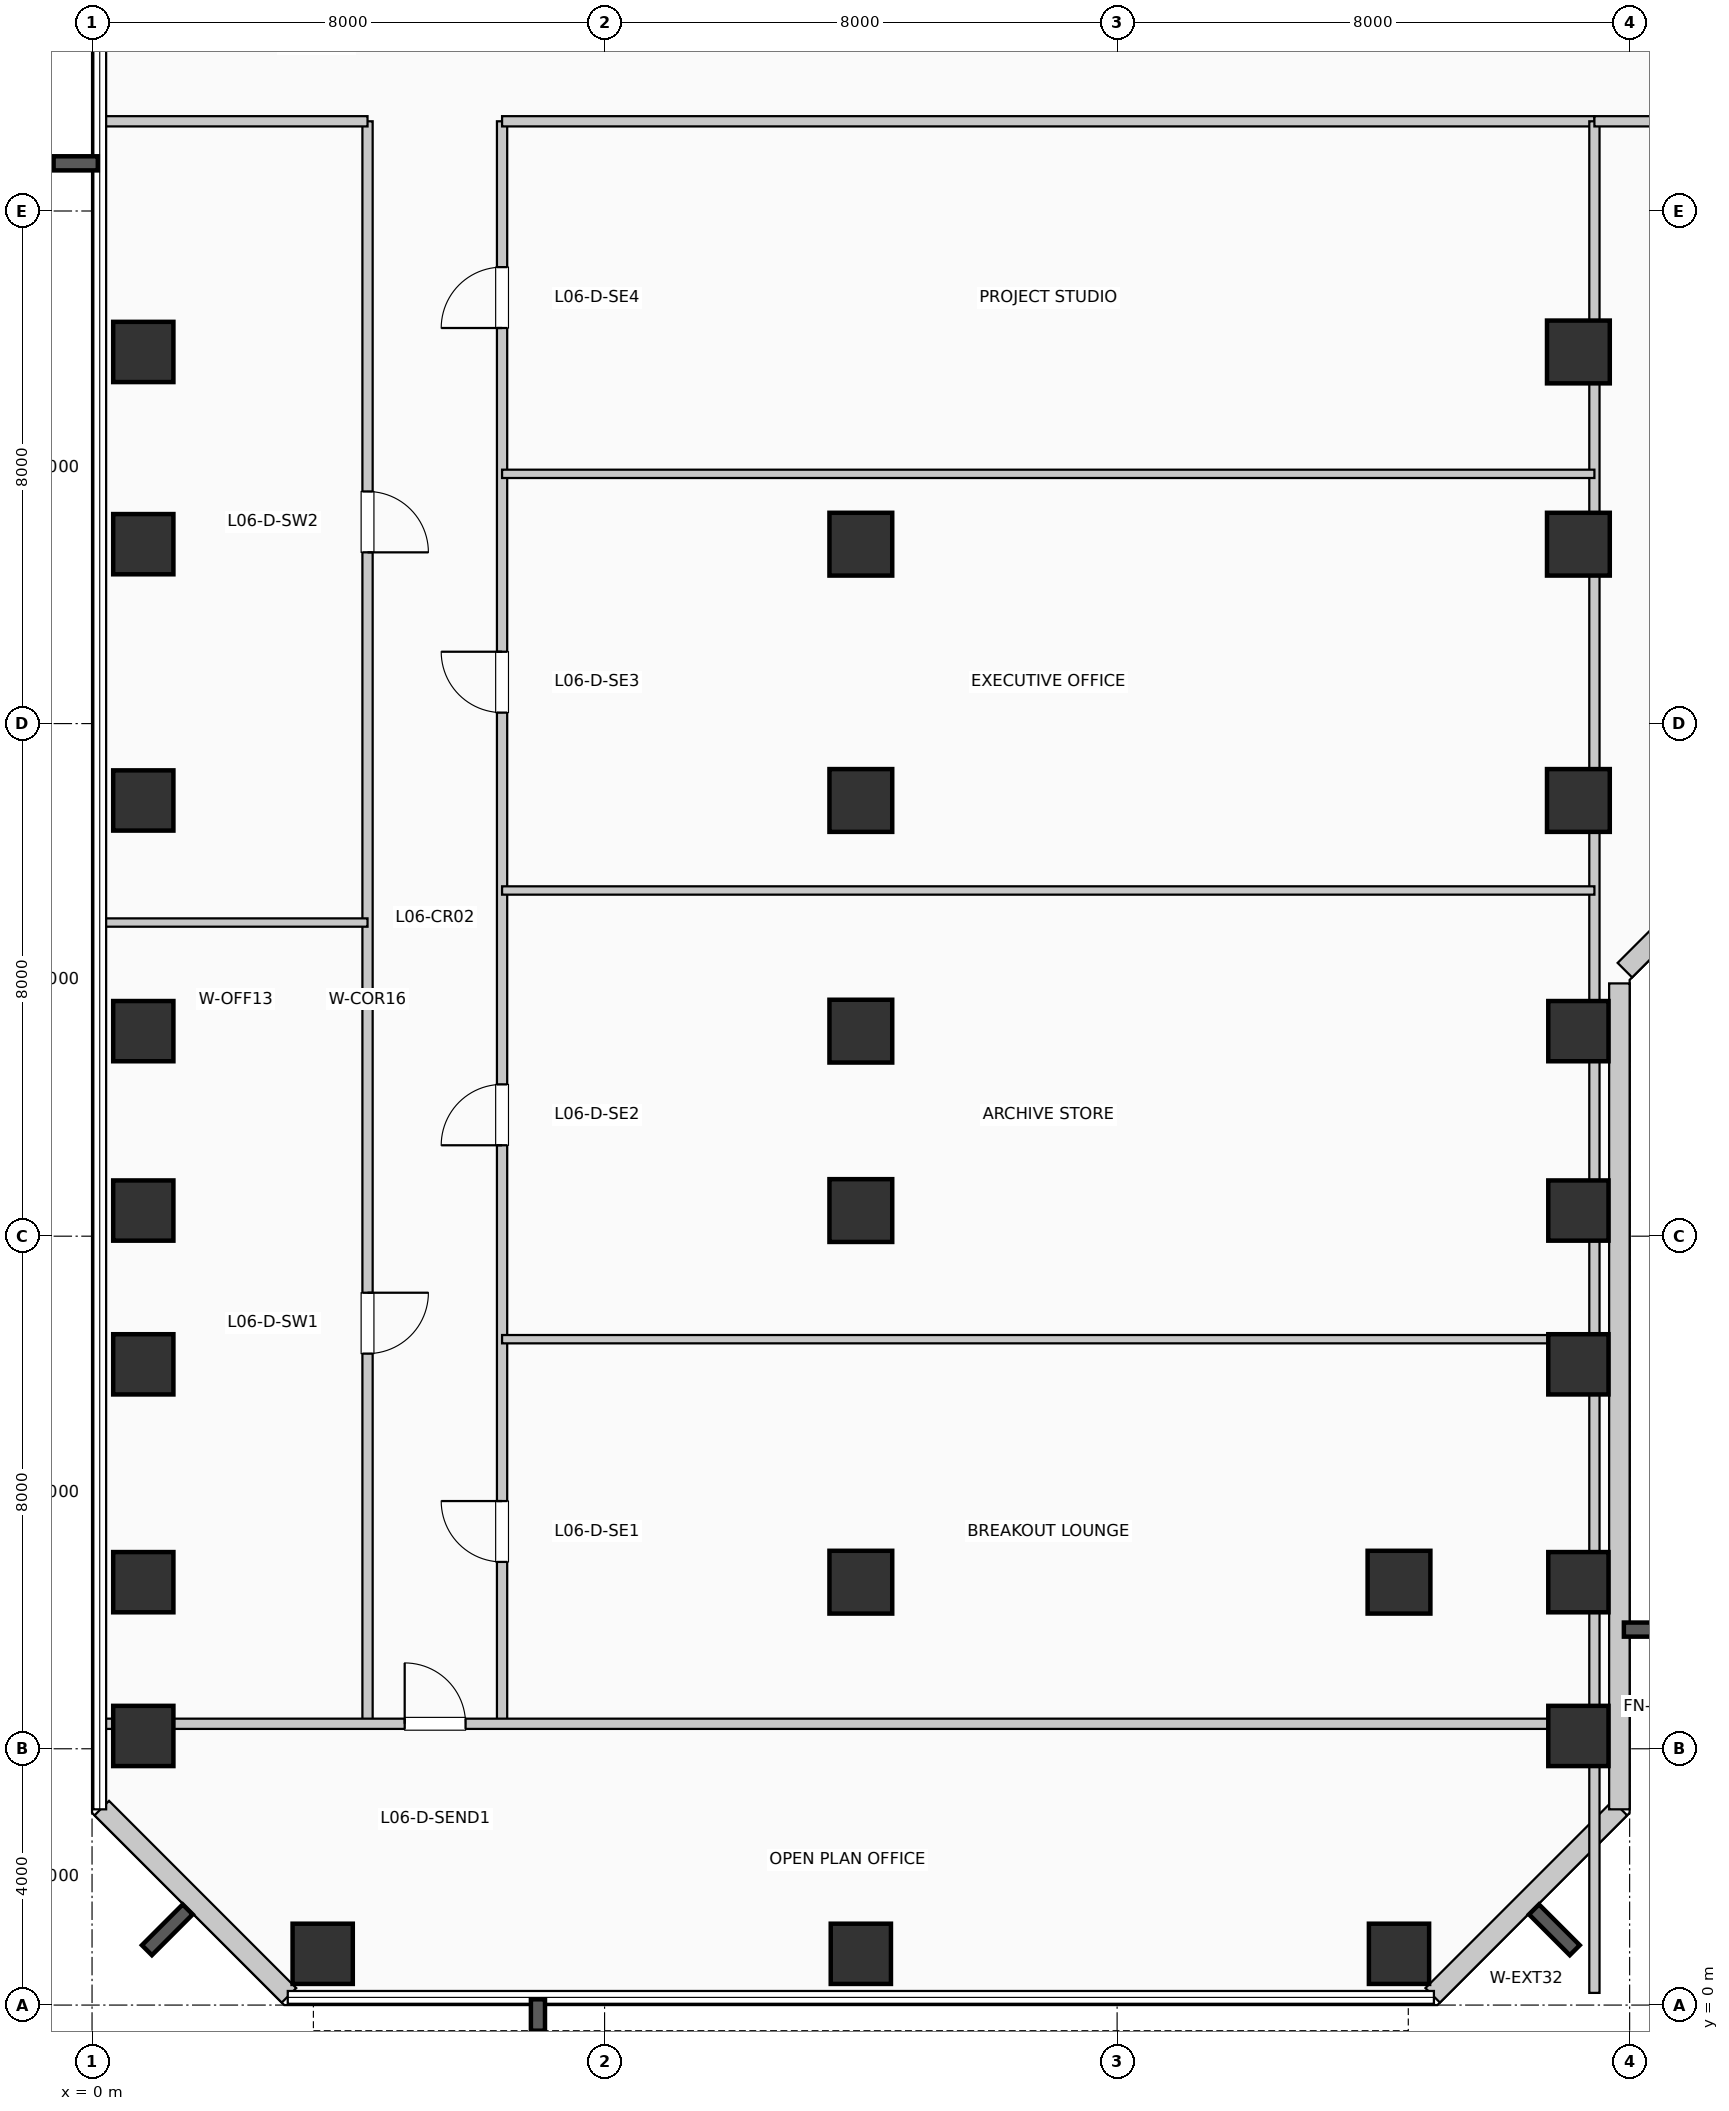
"""IFC4 building model, lengths in metres.
Left out: names, types, materials, properties, quantities, classifications, styles, units other than length and angle.
Written with IfcOpenShell. Run it as: python <this file> out.ifc"""

import sys

from ifc_helpers import new_model, si_unit, direction, frame, frame_2d, origin, origin_2d, place, context, subcontext, project, spatial, rectangle, extrude, element, fill, save


model = new_model("IFC4")
c1 = context("Model", 3, precision=1e-05, world=origin(), true_north=direction((0.0, 1.0)))
c2 = subcontext(c1, "Body", "Model", "MODEL_VIEW")
j1 = project(units=[si_unit("LENGTHUNIT", "METRE"), si_unit("PLANEANGLEUNIT", "RADIAN")], contexts=[c1])
p1 = place(None, origin())
s1 = spatial("IfcSite", under=j1, at=p1, CompositionType="ELEMENT")
p2 = place(p1, origin())
s2 = spatial("IfcBuilding", under=s1, at=p2, CompositionType="ELEMENT")
p3 = place(p2, frame((0.0, 0.0, 30.36)))
s3 = spatial("IfcBuildingStorey", under=s2, at=p3, CompositionType="ELEMENT", Elevation=30.36)
for number, where, z_axis, x_axis in (
    (1, (0.8, 4.2, 0.0), (0.0, 0.0, 1.0), (1.0, 0.0, 0.0)),
    (2, (0.8, 6.6, 0.0), (0.0, 0.0, 1.0), (1.0, 0.0, 0.0)),
    (3, (0.8, 10.0, 0.0), (0.0, 0.0, 1.0), (1.0, 0.0, 0.0)),
    (4, (0.8, 12.4, 0.0), (0.0, 0.0, 1.0), (1.0, 0.0, 0.0)),
    (5, (0.8, 15.2, 0.0), (0.0, 0.0, 1.0), (1.0, 0.0, 0.0)),
    (6, (0.8, 18.8, 0.0), (0.0, 0.0, 1.0), (1.0, 0.0, 0.0)),
    (7, (0.8, 22.8, 0.0), (0.0, 0.0, 1.0), (1.0, 0.0, 0.0)),
    (8, (0.8, 25.8, 0.0), (0.0, 0.0, 1.0), (1.0, 0.0, 0.0)),
    (9, (3.6, 0.8, 0.0), (0.0, 0.0, 1.0), (1.0, 0.0, 0.0)),
    (10, (12.0, 0.8, 0.0), (0.0, 0.0, 1.0), (1.0, 0.0, 0.0)),
):
    element("IfcColumn", number, at=place(p3, frame(where, z_axis=z_axis, x_axis=x_axis)), inside=s3, PredefinedType="COLUMN", context=c2, shape_type="SweptSolid", body=[
        extrude(rectangle(XDim=0.94, YDim=0.94, at=origin_2d()), origin(), (0.0, 0.0, 1.0), 3.96),
    ])
for number, where, z_axis, x_axis in (
    (11, (12.0, 6.6, 0.0), (0.0, 0.0, 1.0), (1.0, 0.0, 0.0)),
    (12, (12.0, 12.4, 0.0), (0.0, 0.0, 1.0), (1.0, 0.0, 0.0)),
    (13, (12.0, 15.2, 0.0), (0.0, 0.0, 1.0), (1.0, 0.0, 0.0)),
    (14, (12.0, 18.8, 0.0), (0.0, 0.0, 1.0), (1.0, 0.0, 0.0)),
    (15, (12.0, 22.8, 0.0), (0.0, 0.0, 1.0), (1.0, 0.0, 0.0)),
):
    element("IfcColumn", number, at=place(p3, frame(where, z_axis=z_axis, x_axis=x_axis)), inside=s3, PredefinedType="COLUMN", context=c2, shape_type="SweptSolid", body=[
        extrude(rectangle(XDim=0.98, YDim=0.98, at=origin_2d()), origin(), (0.0, 0.0, 1.0), 3.96),
    ])
p4 = place(p3, frame((20.4, 0.8, 0.0), z_axis=(0.0, 0.0, 1.0), x_axis=(1.0, 0.0, 0.0)))
e16 = element("IfcColumn", 16, at=p4, inside=s3, PredefinedType="COLUMN", context=c2, shape_type="SweptSolid", body=[
    extrude(rectangle(XDim=0.94, YDim=0.94, at=origin_2d()), origin(), (0.0, 0.0, 1.0), 3.96),
])
p5 = place(p3, frame((20.4, 6.6, 0.0), z_axis=(0.0, 0.0, 1.0), x_axis=(1.0, 0.0, 0.0)))
e17 = element("IfcColumn", 17, at=p5, inside=s3, PredefinedType="COLUMN", context=c2, shape_type="SweptSolid", body=[
    extrude(rectangle(XDim=0.98, YDim=0.98, at=origin_2d()), origin(), (0.0, 0.0, 1.0), 3.96),
])
for number, where, z_axis, x_axis in (
    (18, (23.2, 4.2, 0.0), (0.0, 0.0, 1.0), (1.0, 0.0, 0.0)),
    (19, (23.2, 6.6, 0.0), (0.0, 0.0, 1.0), (1.0, 0.0, 0.0)),
    (20, (23.2, 10.0, 0.0), (0.0, 0.0, 1.0), (1.0, 0.0, 0.0)),
    (21, (23.2, 12.4, 0.0), (0.0, 0.0, 1.0), (1.0, 0.0, 0.0)),
    (22, (23.2, 15.2, 0.0), (0.0, 0.0, 1.0), (1.0, 0.0, 0.0)),
):
    element("IfcColumn", number, at=place(p3, frame(where, z_axis=z_axis, x_axis=x_axis)), inside=s3, PredefinedType="COLUMN", context=c2, shape_type="SweptSolid", body=[
        extrude(rectangle(XDim=0.94, YDim=0.94, at=origin_2d()), origin(), (0.0, 0.0, 1.0), 3.96),
    ])
for number, where, z_axis, x_axis in (
    (23, (23.2, 18.8, 0.0), (0.0, 0.0, 1.0), (1.0, 0.0, 0.0)),
    (24, (23.2, 22.8, 0.0), (0.0, 0.0, 1.0), (1.0, 0.0, 0.0)),
    (25, (23.2, 25.8, 0.0), (0.0, 0.0, 1.0), (1.0, 0.0, 0.0)),
):
    element("IfcColumn", number, at=place(p3, frame(where, z_axis=z_axis, x_axis=x_axis)), inside=s3, PredefinedType="COLUMN", context=c2, shape_type="SweptSolid", body=[
        extrude(rectangle(XDim=0.98, YDim=0.98, at=origin_2d()), origin(), (0.0, 0.0, 1.0), 3.96),
    ])
p6 = place(p3, frame((20.926, 0.152, 0.0), z_axis=(0.0, 0.0, 1.0), x_axis=(0.707106781187, 0.707106781187, 0.0)))
e26 = element("IfcWall", 26, at=p6, inside=s3, PredefinedType="SOLIDWALL", context=c2, shape_type="SweptSolid", body=[
    extrude(rectangle(XDim=4.133, YDim=0.32, at=frame_2d((2.066, 0.0))), origin(), (0.0, 0.0, 1.0), 3.71),
])
p7 = place(p3, frame((23.84, 3.055, 0.0), z_axis=(0.0, 0.0, 1.0), x_axis=(0.0, 1.0, 0.0)))
e27 = element("IfcWall", 27, at=p7, inside=s3, PredefinedType="SOLIDWALL", context=c2, shape_type="SweptSolid", body=[
    extrude(rectangle(XDim=12.89, YDim=0.32, at=frame_2d((6.445, 0.0))), origin(), (0.0, 0.0, 1.0), 3.71),
])
p8 = place(p3, frame((23.926, 16.152, 0.0), z_axis=(0.0, 0.0, 1.0), x_axis=(0.707106781187, 0.707106781187, 0.0)))
e28 = element("IfcWall", 28, at=p8, inside=s3, PredefinedType="SOLIDWALL", context=c2, shape_type="SweptSolid", body=[
    extrude(rectangle(XDim=2.718, YDim=0.32, at=frame_2d((1.359, 0.0))), origin(), (0.0, 0.0, 1.0), 3.71),
])
p9 = place(p3, frame((0.152, 3.074, 0.0), z_axis=(0.0, 0.0, 1.0), x_axis=(0.707106781187, -0.707106781187, 0.0)))
e29 = element("IfcWall", 29, at=p9, inside=s3, PredefinedType="SOLIDWALL", context=c2, shape_type="SweptSolid", body=[
    extrude(rectangle(XDim=4.133, YDim=0.32, at=frame_2d((2.066, 0.0))), origin(), (0.0, 0.0, 1.0), 3.71),
])
p10 = place(p3, frame((4.3, 4.39, 0.0), z_axis=(0.0, 0.0, 1.0), x_axis=(0.0, 1.0, 0.0)))
e30 = element("IfcWall", 30, at=p10, inside=s3, PredefinedType="PARTITIONING", context=c2, shape_type="SweptSolid", body=[
    extrude(rectangle(XDim=25.01, YDim=0.16, at=frame_2d((12.505, 0.0))), origin(), (0.0, 0.0, 1.0), 3.71),
])
p11 = place(p10, frame((6.728, 0.0, 0.0), z_axis=(0.0, 0.0, 1.0), x_axis=(-1.0, 0.0, 0.0)))
e31 = element("IfcOpeningElement", 31, at=p11, cuts=e30, PredefinedType="OPENING", context=c2, shape_type="SweptSolid", body=[
    extrude(rectangle(XDim=0.95, YDim=2.15, at=frame_2d((0.475, 1.075))), frame((0.0, 0.09, 0.0), z_axis=(0.0, -1.0, 0.0), x_axis=(1.0, 0.0, 0.0)), (0.0, 0.0, 1.0), 0.18),
])
p12 = place(p10, frame((19.232, 0.0, 0.0), z_axis=(0.0, 0.0, 1.0), x_axis=(-1.0, 0.0, 0.0)))
e32 = element("IfcOpeningElement", 32, at=p12, cuts=e30, PredefinedType="OPENING", context=c2, shape_type="SweptSolid", body=[
    extrude(rectangle(XDim=0.95, YDim=2.15, at=frame_2d((0.475, 1.075))), frame((0.0, 0.09, 0.0), z_axis=(0.0, -1.0, 0.0), x_axis=(1.0, 0.0, 0.0)), (0.0, 0.0, 1.0), 0.18),
])
p13 = place(p3, frame((6.4, 4.39, 0.0), z_axis=(0.0, 0.0, 1.0), x_axis=(0.0, 1.0, 0.0)))
e33 = element("IfcWall", 33, at=p13, inside=s3, PredefinedType="PARTITIONING", context=c2, shape_type="SweptSolid", body=[
    extrude(rectangle(XDim=25.01, YDim=0.16, at=frame_2d((12.505, 0.0))), origin(), (0.0, 0.0, 1.0), 3.71),
])
p14 = place(p13, frame((2.526, 0.0, 0.0)))
e34 = element("IfcOpeningElement", 34, at=p14, cuts=e33, PredefinedType="OPENING", context=c2, shape_type="SweptSolid", body=[
    extrude(rectangle(XDim=0.95, YDim=2.15, at=frame_2d((0.475, 1.075))), frame((0.0, 0.09, 0.0), z_axis=(0.0, -1.0, 0.0), x_axis=(1.0, 0.0, 0.0)), (0.0, 0.0, 1.0), 0.18),
])
p15 = place(p13, frame((9.029, 0.0, 0.0)))
e35 = element("IfcOpeningElement", 35, at=p15, cuts=e33, PredefinedType="OPENING", context=c2, shape_type="SweptSolid", body=[
    extrude(rectangle(XDim=0.95, YDim=2.15, at=frame_2d((0.475, 1.075))), frame((0.0, 0.09, 0.0), z_axis=(0.0, -1.0, 0.0), x_axis=(1.0, 0.0, 0.0)), (0.0, 0.0, 1.0), 0.18),
])
p16 = place(p13, frame((15.781, 0.0, 0.0)))
e36 = element("IfcOpeningElement", 36, at=p16, cuts=e33, PredefinedType="OPENING", context=c2, shape_type="SweptSolid", body=[
    extrude(rectangle(XDim=0.95, YDim=2.15, at=frame_2d((0.475, 1.075))), frame((0.0, 0.09, 0.0), z_axis=(0.0, -1.0, 0.0), x_axis=(1.0, 0.0, 0.0)), (0.0, 0.0, 1.0), 0.18),
])
p17 = place(p13, frame((21.784, 0.0, 0.0)))
e37 = element("IfcOpeningElement", 37, at=p17, cuts=e33, PredefinedType="OPENING", context=c2, shape_type="SweptSolid", body=[
    extrude(rectangle(XDim=0.95, YDim=2.15, at=frame_2d((0.475, 1.075))), frame((0.0, 0.09, 0.0), z_axis=(0.0, -1.0, 0.0), x_axis=(1.0, 0.0, 0.0)), (0.0, 0.0, 1.0), 0.18),
])
p18 = place(p3, frame((0.19, 4.39, 0.0), z_axis=(0.0, 0.0, 1.0), x_axis=(1.0, 0.0, 0.0)))
e38 = element("IfcWall", 38, at=p18, inside=s3, PredefinedType="PARTITIONING", context=c2, shape_type="SweptSolid", body=[
    extrude(rectangle(XDim=23.26, YDim=0.16, at=frame_2d((11.63, 0.0))), origin(), (0.0, 0.0, 1.0), 2.995),
])
p19 = place(p18, frame((4.69, 0.0, 0.0)))
e39 = element("IfcOpeningElement", 39, at=p19, cuts=e38, PredefinedType="OPENING", context=c2, shape_type="SweptSolid", body=[
    extrude(rectangle(XDim=0.95, YDim=2.15, at=frame_2d((0.475, 1.075))), frame((0.0, 0.09, 0.0), z_axis=(0.0, -1.0, 0.0), x_axis=(1.0, 0.0, 0.0)), (0.0, 0.0, 1.0), 0.18),
])
p20 = place(p3, frame((0.19, 29.4, 0.0), z_axis=(0.0, 0.0, 1.0), x_axis=(1.0, 0.0, 0.0)))
e40 = element("IfcWall", 40, at=p20, inside=s3, PredefinedType="PARTITIONING", context=c2, shape_type="SweptSolid", body=[
    extrude(rectangle(XDim=4.11, YDim=0.16, at=frame_2d((2.055, 0.0))), origin(), (0.0, 0.0, 1.0), 3.365),
])
p21 = place(p3, frame((6.4, 29.4, 0.0), z_axis=(0.0, 0.0, 1.0), x_axis=(1.0, 0.0, 0.0)))
e41 = element("IfcWall", 41, at=p21, inside=s3, PredefinedType="PARTITIONING", context=c2, shape_type="SweptSolid", body=[
    extrude(rectangle(XDim=17.05, YDim=0.16, at=frame_2d((8.525, 0.0))), origin(), (0.0, 0.0, 1.0), 3.365),
])
p22 = place(p3, frame((23.45, 0.19, 0.0), z_axis=(0.0, 0.0, 1.0), x_axis=(0.0, 1.0, 0.0)))
e42 = element("IfcWall", 42, at=p22, inside=s3, PredefinedType="PARTITIONING", context=c2, shape_type="SweptSolid", body=[
    extrude(rectangle(XDim=29.21, YDim=0.16, at=frame_2d((14.605, 0.0))), origin(), (0.0, 0.0, 1.0), 2.995),
])
p23 = place(p3, frame((0.19, 16.895, 0.0), z_axis=(0.0, 0.0, 1.0), x_axis=(1.0, 0.0, 0.0)))
e43 = element("IfcWall", 43, at=p23, inside=s3, PredefinedType="PARTITIONING", context=c2, shape_type="SweptSolid", body=[
    extrude(rectangle(XDim=4.11, YDim=0.13, at=frame_2d((2.055, 0.0))), origin(), (0.0, 0.0, 1.0), 3.71),
])
p24 = place(p3, frame((6.4, 10.392, 0.0), z_axis=(0.0, 0.0, 1.0), x_axis=(1.0, 0.0, 0.0)))
e44 = element("IfcWall", 44, at=p24, inside=s3, PredefinedType="PARTITIONING", context=c2, shape_type="SweptSolid", body=[
    extrude(rectangle(XDim=17.05, YDim=0.13, at=frame_2d((8.525, 0.0))), origin(), (0.0, 0.0, 1.0), 2.995),
])
for number, where, z_axis, x_axis in (
    (45, (6.4, 17.395, 0.0), (0.0, 0.0, 1.0), (1.0, 0.0, 0.0)),
    (46, (6.4, 23.898, 0.0), (0.0, 0.0, 1.0), (1.0, 0.0, 0.0)),
):
    element("IfcWall", number, at=place(p3, frame(where, z_axis=z_axis, x_axis=x_axis)), inside=s3, PredefinedType="PARTITIONING", context=c2, shape_type="SweptSolid", body=[
        extrude(rectangle(XDim=17.05, YDim=0.13, at=frame_2d((8.525, 0.0))), origin(), (0.0, 0.0, 1.0), 3.71),
    ])
p25 = place(p3, frame((23.45, 29.4, 0.0), z_axis=(0.0, 0.0, 1.0), x_axis=(1.0, 0.0, 0.0)))
e47 = element("IfcWall", 47, at=p25, inside=s3, PredefinedType="PARTITIONING", context=c2, shape_type="SweptSolid", body=[
    extrude(rectangle(XDim=32.36, YDim=0.16, at=frame_2d((16.18, 0.0))), origin(), (0.0, 0.0, 1.0), 3.365),
])
p26 = place(p25, frame((5.976, 0.0, 0.0), z_axis=(0.0, 0.0, 1.0), x_axis=(-1.0, 0.0, 0.0)))
e48 = element("IfcOpeningElement", 48, at=p26, cuts=e47, PredefinedType="OPENING", context=c2, shape_type="SweptSolid", body=[
    extrude(rectangle(XDim=0.95, YDim=2.15, at=frame_2d((0.475, 1.075))), frame((0.0, 0.09, 0.0), z_axis=(0.0, -1.0, 0.0), x_axis=(1.0, 0.0, 0.0)), (0.0, 0.0, 1.0), 0.18),
])
p27 = place(p25, frame((16.979, 0.0, 0.0), z_axis=(0.0, 0.0, 1.0), x_axis=(-1.0, 0.0, 0.0)))
e49 = element("IfcOpeningElement", 49, at=p27, cuts=e47, PredefinedType="OPENING", context=c2, shape_type="SweptSolid", body=[
    extrude(rectangle(XDim=0.95, YDim=2.15, at=frame_2d((0.475, 1.075))), frame((0.0, 0.09, 0.0), z_axis=(0.0, -1.0, 0.0), x_axis=(1.0, 0.0, 0.0)), (0.0, 0.0, 1.0), 0.18),
])
p28 = place(p25, frame((27.657, 0.0, 0.0), z_axis=(0.0, 0.0, 1.0), x_axis=(-1.0, 0.0, 0.0)))
e50 = element("IfcOpeningElement", 50, at=p28, cuts=e47, PredefinedType="OPENING", context=c2, shape_type="SweptSolid", body=[
    extrude(rectangle(XDim=0.95, YDim=2.15, at=frame_2d((0.475, 1.075))), frame((0.0, 0.09, 0.0), z_axis=(0.0, -1.0, 0.0), x_axis=(1.0, 0.0, 0.0)), (0.0, 0.0, 1.0), 0.18),
])
p29 = place(p19, origin())
e51 = element("IfcDoor", 51, at=p29, inside=s3, OperationType="SINGLE_SWING_LEFT", PredefinedType="DOOR", context=c2, shape_type="SweptSolid", body=[
    extrude(rectangle(XDim=0.95, YDim=2.15, at=frame_2d((0.475, 1.075))), frame((0.0, 0.025, 0.0), z_axis=(0.0, -1.0, 0.0), x_axis=(1.0, 0.0, 0.0)), (0.0, 0.0, 1.0), 0.05),
])
fill(e39, e51)
p30 = place(p11, origin())
e52 = element("IfcDoor", 52, at=p30, inside=s3, OperationType="SINGLE_SWING_RIGHT", PredefinedType="DOOR", context=c2, shape_type="SweptSolid", body=[
    extrude(rectangle(XDim=0.95, YDim=2.15, at=frame_2d((0.475, 1.075))), frame((0.0, 0.025, 0.0), z_axis=(0.0, -1.0, 0.0), x_axis=(1.0, 0.0, 0.0)), (0.0, 0.0, 1.0), 0.05),
])
fill(e31, e52)
p31 = place(p12, origin())
e53 = element("IfcDoor", 53, at=p31, inside=s3, OperationType="SINGLE_SWING_LEFT", PredefinedType="DOOR", context=c2, shape_type="SweptSolid", body=[
    extrude(rectangle(XDim=0.95, YDim=2.15, at=frame_2d((0.475, 1.075))), frame((0.0, 0.025, 0.0), z_axis=(0.0, -1.0, 0.0), x_axis=(1.0, 0.0, 0.0)), (0.0, 0.0, 1.0), 0.05),
])
fill(e32, e53)
p32 = place(p14, origin())
e54 = element("IfcDoor", 54, at=p32, inside=s3, OperationType="SINGLE_SWING_RIGHT", PredefinedType="DOOR", context=c2, shape_type="SweptSolid", body=[
    extrude(rectangle(XDim=0.95, YDim=2.15, at=frame_2d((0.475, 1.075))), frame((0.0, 0.025, 0.0), z_axis=(0.0, -1.0, 0.0), x_axis=(1.0, 0.0, 0.0)), (0.0, 0.0, 1.0), 0.05),
])
fill(e34, e54)
p33 = place(p15, origin())
e55 = element("IfcDoor", 55, at=p33, inside=s3, OperationType="SINGLE_SWING_LEFT", PredefinedType="DOOR", context=c2, shape_type="SweptSolid", body=[
    extrude(rectangle(XDim=0.95, YDim=2.15, at=frame_2d((0.475, 1.075))), frame((0.0, 0.025, 0.0), z_axis=(0.0, -1.0, 0.0), x_axis=(1.0, 0.0, 0.0)), (0.0, 0.0, 1.0), 0.05),
])
fill(e35, e55)
p34 = place(p16, origin())
e56 = element("IfcDoor", 56, at=p34, inside=s3, OperationType="SINGLE_SWING_RIGHT", PredefinedType="DOOR", context=c2, shape_type="SweptSolid", body=[
    extrude(rectangle(XDim=0.95, YDim=2.15, at=frame_2d((0.475, 1.075))), frame((0.0, 0.025, 0.0), z_axis=(0.0, -1.0, 0.0), x_axis=(1.0, 0.0, 0.0)), (0.0, 0.0, 1.0), 0.05),
])
fill(e36, e56)
p35 = place(p17, origin())
e57 = element("IfcDoor", 57, at=p35, inside=s3, OperationType="SINGLE_SWING_LEFT", PredefinedType="DOOR", context=c2, shape_type="SweptSolid", body=[
    extrude(rectangle(XDim=0.95, YDim=2.15, at=frame_2d((0.475, 1.075))), frame((0.0, 0.025, 0.0), z_axis=(0.0, -1.0, 0.0), x_axis=(1.0, 0.0, 0.0)), (0.0, 0.0, 1.0), 0.05),
])
fill(e37, e57)
save(model, sys.argv[1])
